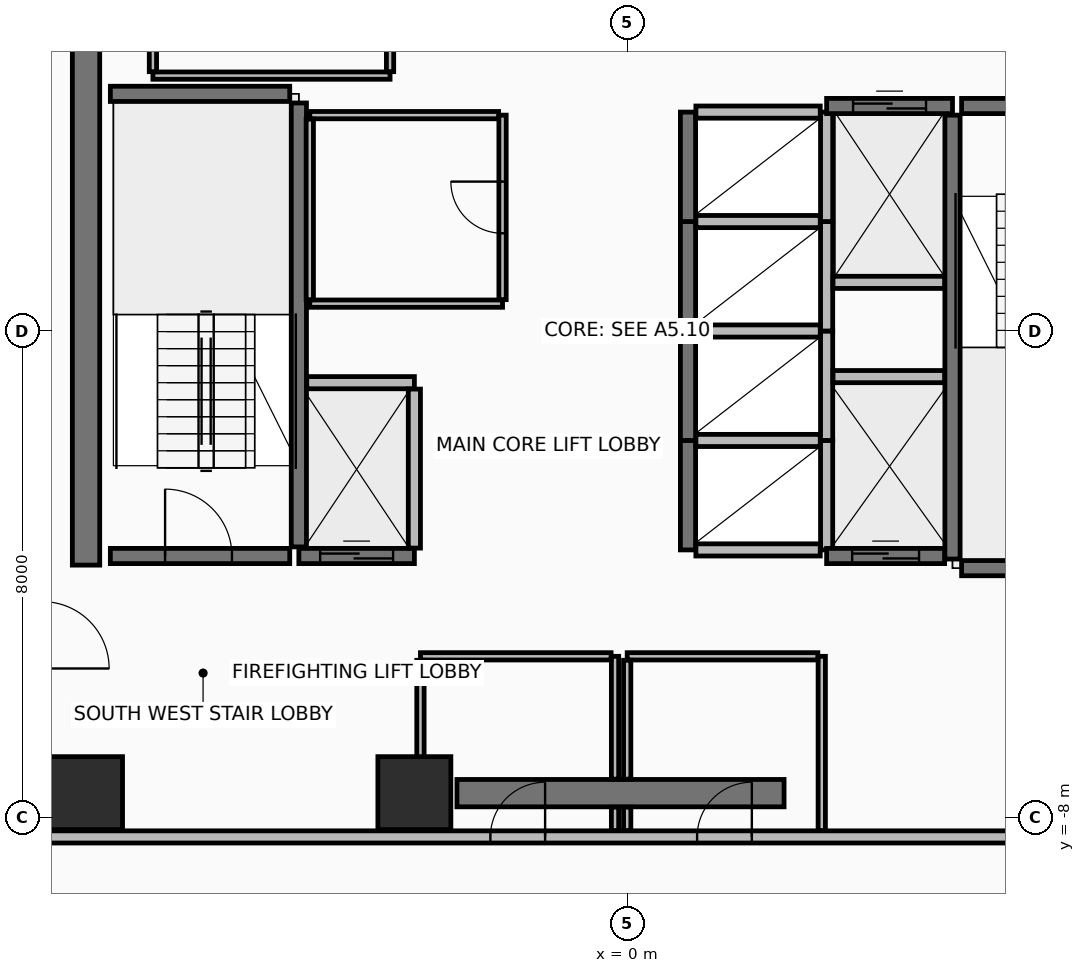
"""IFC4 building model, lengths in metres.
Left out: names, types, materials, properties, quantities, classifications, styles, units other than length and angle.
Written with IfcOpenShell. Run it as: python <this file> out.ifc"""

import sys

from ifc_helpers import new_model, si_unit, direction, frame, frame_2d, origin, origin_2d, place, context, subcontext, project, spatial, rectangle, extrude, element, fill, save


model = new_model("IFC4")
c1 = context("Model", 3, precision=1e-05, world=origin(), true_north=direction((0.0, 1.0)))
c2 = subcontext(c1, "Body", "Model", "MODEL_VIEW")
j1 = project(units=[si_unit("LENGTHUNIT", "METRE"), si_unit("PLANEANGLEUNIT", "RADIAN")], contexts=[c1])
p1 = place(None, origin())
s1 = spatial("IfcSite", under=j1, at=p1, CompositionType="ELEMENT")
p2 = place(p1, origin())
s2 = spatial("IfcBuilding", under=s1, at=p2, CompositionType="ELEMENT")
p3 = place(p2, frame((0.0, 0.0, 211.25)))
s3 = spatial("IfcBuildingStorey", under=s2, at=p3, CompositionType="ELEMENT", Elevation=211.25)
for number, where, z_axis, x_axis in (
    (1, (-8.9, -7.6, 0.0), (0.0, 0.0, 1.0), (1.0, 0.0, 0.0)),
    (2, (-3.5, -7.6, 0.0), (0.0, 0.0, 1.0), (1.0, 0.0, 0.0)),
):
    element("IfcColumn", number, at=place(p3, frame(where, z_axis=z_axis, x_axis=x_axis)), inside=s3, PredefinedType="COLUMN", context=c2, shape_type="SweptSolid", body=[
        extrude(rectangle(XDim=1.2, YDim=1.2, at=origin_2d()), origin(), (0.0, 0.0, 1.0), 3.6),
    ])
p4 = place(p3, frame((-2.8, -7.6, 0.0), z_axis=(0.0, 0.0, 1.0), x_axis=(1.0, 0.0, 0.0)))
e3 = element("IfcWall", 3, at=p4, inside=s3, PredefinedType="SHEAR", context=c2, shape_type="SweptSolid", body=[
    extrude(rectangle(XDim=5.38, YDim=0.45, at=frame_2d((2.69, 0.0))), origin(), (0.0, 0.0, 1.0), 3.42),
])
p5 = place(p3, frame((-8.9, -3.85, 0.0), z_axis=(0.0, 0.0, 1.0), x_axis=(0.0, 1.0, 0.0)))
e4 = element("IfcWall", 4, at=p5, inside=s3, PredefinedType="SHEAR", context=c2, shape_type="SweptSolid", body=[
    extrude(rectangle(XDim=10.7, YDim=0.45, at=frame_2d((5.35, 0.0))), origin(), (0.0, 0.0, 1.0), 3.42),
])
p6 = place(p3, frame((-9.62, -8.32, 0.0), z_axis=(0.0, 0.0, 1.0), x_axis=(1.0, 0.0, 0.0)))
e5 = element("IfcWall", 5, at=p6, inside=s3, PredefinedType="PARTITIONING", context=c2, shape_type="SweptSolid", body=[
    extrude(rectangle(XDim=19.24, YDim=0.2, at=frame_2d((9.62, 0.0))), origin(), (0.0, 0.0, 1.0), 2.865),
])
p7 = place(p6, frame((7.37, 0.0, 0.0)))
e6 = element("IfcOpeningElement", 6, at=p7, cuts=e5, PredefinedType="OPENING", context=c2, shape_type="SweptSolid", body=[
    extrude(rectangle(XDim=0.9, YDim=2.1, at=frame_2d((0.45, 1.05))), frame((0.0, 0.11, 0.0), z_axis=(0.0, -1.0, 0.0), x_axis=(1.0, 0.0, 0.0)), (0.0, 0.0, 1.0), 0.22),
])
p8 = place(p6, frame((10.77, 0.0, 0.0)))
e7 = element("IfcOpeningElement", 7, at=p8, cuts=e5, PredefinedType="OPENING", context=c2, shape_type="SweptSolid", body=[
    extrude(rectangle(XDim=0.9, YDim=2.1, at=frame_2d((0.45, 1.05))), frame((0.0, 0.11, 0.0), z_axis=(0.0, -1.0, 0.0), x_axis=(1.0, 0.0, 0.0)), (0.0, 0.0, 1.0), 0.22),
])
p9 = place(p3, frame((-5.4, -3.55, 0.0), z_axis=(0.0, 0.0, 1.0), x_axis=(0.0, 1.0, 0.0)))
e8 = element("IfcWall", 8, at=p9, inside=s3, PredefinedType="SHEAR", context=c2, shape_type="SweptSolid", body=[
    extrude(rectangle(XDim=7.3, YDim=0.25, at=frame_2d((3.65, 0.0))), origin(), (0.0, 0.0, 1.0), 3.42),
])
p10 = place(p3, frame((-8.5, -3.7, 0.0), z_axis=(0.0, 0.0, 1.0), x_axis=(1.0, 0.0, 0.0)))
e9 = element("IfcWall", 9, at=p10, inside=s3, PredefinedType="SHEAR", context=c2, shape_type="SweptSolid", body=[
    extrude(rectangle(XDim=2.95, YDim=0.25, at=frame_2d((1.475, 0.0))), origin(), (0.0, 0.0, 1.0), 3.42),
])
p11 = place(p10, frame((0.9, 0.0, 0.0)))
e10 = element("IfcOpeningElement", 10, at=p11, cuts=e9, PredefinedType="OPENING", context=c2, shape_type="SweptSolid", body=[
    extrude(rectangle(XDim=1.1, YDim=2.15, at=frame_2d((0.55, 1.075))), frame((0.0, 0.135, 0.0), z_axis=(0.0, -1.0, 0.0), x_axis=(1.0, 0.0, 0.0)), (0.0, 0.0, 1.0), 0.27),
])
p12 = place(p3, frame((-8.5, 3.9, 0.0), z_axis=(0.0, 0.0, 1.0), x_axis=(1.0, 0.0, 0.0)))
e11 = element("IfcWall", 11, at=p12, inside=s3, PredefinedType="SHEAR", context=c2, shape_type="SweptSolid", body=[
    extrude(rectangle(XDim=2.95, YDim=0.25, at=frame_2d((1.475, 0.0))), origin(), (0.0, 0.0, 1.0), 3.42),
])
p13 = place(p3, frame((5.35, -3.75, 0.0), z_axis=(0.0, 0.0, 1.0), x_axis=(0.0, 1.0, 0.0)))
e12 = element("IfcWall", 12, at=p13, inside=s3, PredefinedType="SHEAR", context=c2, shape_type="SweptSolid", body=[
    extrude(rectangle(XDim=7.3, YDim=0.25, at=frame_2d((3.65, 0.0))), origin(), (0.0, 0.0, 1.0), 3.42),
])
p14 = place(p3, frame((5.5, 3.7, 0.0), z_axis=(0.0, 0.0, 1.0), x_axis=(1.0, 0.0, 0.0)))
e13 = element("IfcWall", 13, at=p14, inside=s3, PredefinedType="SHEAR", context=c2, shape_type="SweptSolid", body=[
    extrude(rectangle(XDim=3.0, YDim=0.25, at=frame_2d((1.5, 0.0))), origin(), (0.0, 0.0, 1.0), 3.42),
])
p15 = place(p14, frame((0.95, 0.0, 0.0)))
e14 = element("IfcOpeningElement", 14, at=p15, cuts=e13, PredefinedType="OPENING", context=c2, shape_type="SweptSolid", body=[
    extrude(rectangle(XDim=1.1, YDim=2.15, at=frame_2d((0.55, 1.075))), frame((0.0, 0.135, 0.0), z_axis=(0.0, -1.0, 0.0), x_axis=(1.0, 0.0, 0.0)), (0.0, 0.0, 1.0), 0.27),
])
p16 = place(p3, frame((5.5, -3.9, 0.0), z_axis=(0.0, 0.0, 1.0), x_axis=(1.0, 0.0, 0.0)))
e15 = element("IfcWall", 15, at=p16, inside=s3, PredefinedType="SHEAR", context=c2, shape_type="SweptSolid", body=[
    extrude(rectangle(XDim=3.0, YDim=0.25, at=frame_2d((1.5, 0.0))), origin(), (0.0, 0.0, 1.0), 3.42),
])
p17 = place(p3, frame((1.0, -3.6, 0.0), z_axis=(0.0, 0.0, 1.0), x_axis=(0.0, 1.0, 0.0)))
e16 = element("IfcWall", 16, at=p17, inside=s3, PredefinedType="SHEAR", context=c2, shape_type="SweptSolid", body=[
    extrude(rectangle(XDim=1.8, YDim=0.25, at=frame_2d((0.9, 0.0))), origin(), (0.0, 0.0, 1.0), 3.42),
])
p18 = place(p3, frame((3.28, -3.6, 0.0), z_axis=(0.0, 0.0, 1.0), x_axis=(0.0, 1.0, 0.0)))
e17 = element("IfcWall", 17, at=p18, inside=s3, PredefinedType="PARTITIONING", context=c2, shape_type="SweptSolid", body=[
    extrude(rectangle(XDim=1.8, YDim=0.2, at=frame_2d((0.9, 0.0))), origin(), (0.0, 0.0, 1.0), 3.42),
])
for number, where, z_axis, x_axis in (
    (18, (1.13, -3.6, 0.0), (0.0, 0.0, 1.0), (1.0, 0.0, 0.0)),
    (19, (1.13, -1.8, 0.0), (0.0, 0.0, 1.0), (1.0, 0.0, 0.0)),
):
    element("IfcWall", number, at=place(p3, frame(where, z_axis=z_axis, x_axis=x_axis)), inside=s3, PredefinedType="PARTITIONING", context=c2, shape_type="SweptSolid", body=[
        extrude(rectangle(XDim=2.045, YDim=0.2, at=frame_2d((1.022, 0.0))), origin(), (0.0, 0.0, 1.0), 3.42),
    ])
p19 = place(p3, frame((1.0, -1.8, 0.0), z_axis=(0.0, 0.0, 1.0), x_axis=(0.0, 1.0, 0.0)))
e20 = element("IfcWall", 20, at=p19, inside=s3, PredefinedType="SHEAR", context=c2, shape_type="SweptSolid", body=[
    extrude(rectangle(XDim=1.8, YDim=0.25, at=frame_2d((0.9, 0.0))), origin(), (0.0, 0.0, 1.0), 3.42),
])
p20 = place(p3, frame((3.28, -1.8, 0.0), z_axis=(0.0, 0.0, 1.0), x_axis=(0.0, 1.0, 0.0)))
e21 = element("IfcWall", 21, at=p20, inside=s3, PredefinedType="PARTITIONING", context=c2, shape_type="SweptSolid", body=[
    extrude(rectangle(XDim=1.8, YDim=0.2, at=frame_2d((0.9, 0.0))), origin(), (0.0, 0.0, 1.0), 3.42),
])
p21 = place(p3, frame((1.13, 0.0, 0.0), z_axis=(0.0, 0.0, 1.0), x_axis=(1.0, 0.0, 0.0)))
e22 = element("IfcWall", 22, at=p21, inside=s3, PredefinedType="PARTITIONING", context=c2, shape_type="SweptSolid", body=[
    extrude(rectangle(XDim=2.045, YDim=0.2, at=frame_2d((1.022, 0.0))), origin(), (0.0, 0.0, 1.0), 3.42),
])
p22 = place(p3, frame((1.0, 0.0, 0.0), z_axis=(0.0, 0.0, 1.0), x_axis=(0.0, 1.0, 0.0)))
e23 = element("IfcWall", 23, at=p22, inside=s3, PredefinedType="SHEAR", context=c2, shape_type="SweptSolid", body=[
    extrude(rectangle(XDim=1.8, YDim=0.25, at=frame_2d((0.9, 0.0))), origin(), (0.0, 0.0, 1.0), 3.42),
])
p23 = place(p3, frame((3.28, 0.0, 0.0), z_axis=(0.0, 0.0, 1.0), x_axis=(0.0, 1.0, 0.0)))
e24 = element("IfcWall", 24, at=p23, inside=s3, PredefinedType="PARTITIONING", context=c2, shape_type="SweptSolid", body=[
    extrude(rectangle(XDim=1.8, YDim=0.2, at=frame_2d((0.9, 0.0))), origin(), (0.0, 0.0, 1.0), 3.42),
])
p24 = place(p3, frame((1.13, 1.8, 0.0), z_axis=(0.0, 0.0, 1.0), x_axis=(1.0, 0.0, 0.0)))
e25 = element("IfcWall", 25, at=p24, inside=s3, PredefinedType="PARTITIONING", context=c2, shape_type="SweptSolid", body=[
    extrude(rectangle(XDim=2.045, YDim=0.2, at=frame_2d((1.022, 0.0))), origin(), (0.0, 0.0, 1.0), 3.42),
])
p25 = place(p3, frame((1.0, 1.8, 0.0), z_axis=(0.0, 0.0, 1.0), x_axis=(0.0, 1.0, 0.0)))
e26 = element("IfcWall", 26, at=p25, inside=s3, PredefinedType="SHEAR", context=c2, shape_type="SweptSolid", body=[
    extrude(rectangle(XDim=1.8, YDim=0.25, at=frame_2d((0.9, 0.0))), origin(), (0.0, 0.0, 1.0), 3.42),
])
p26 = place(p3, frame((3.28, 1.8, 0.0), z_axis=(0.0, 0.0, 1.0), x_axis=(0.0, 1.0, 0.0)))
e27 = element("IfcWall", 27, at=p26, inside=s3, PredefinedType="PARTITIONING", context=c2, shape_type="SweptSolid", body=[
    extrude(rectangle(XDim=1.8, YDim=0.2, at=frame_2d((0.9, 0.0))), origin(), (0.0, 0.0, 1.0), 3.42),
])
p27 = place(p3, frame((1.13, 3.6, 0.0), z_axis=(0.0, 0.0, 1.0), x_axis=(1.0, 0.0, 0.0)))
e28 = element("IfcWall", 28, at=p27, inside=s3, PredefinedType="PARTITIONING", context=c2, shape_type="SweptSolid", body=[
    extrude(rectangle(XDim=2.045, YDim=0.2, at=frame_2d((1.022, 0.0))), origin(), (0.0, 0.0, 1.0), 2.715),
])
p28 = place(p3, frame((-5.4, -3.7, 0.0), z_axis=(0.0, 0.0, 1.0), x_axis=(1.0, 0.0, 0.0)))
e29 = element("IfcWall", 29, at=p28, inside=s3, PredefinedType="SHEAR", context=c2, shape_type="SweptSolid", body=[
    extrude(rectangle(XDim=1.9, YDim=0.25, at=frame_2d((0.95, 0.0))), origin(), (0.0, 0.0, 1.0), 3.42),
])
p29 = place(p28, frame((0.35, 0.0, 0.0)))
e30 = element("IfcOpeningElement", 30, at=p29, cuts=e29, PredefinedType="OPENING", context=c2, shape_type="SweptSolid", body=[
    extrude(rectangle(XDim=1.2, YDim=2.2, at=frame_2d((0.6, 1.1))), frame((0.0, 0.135, 0.0), z_axis=(0.0, -1.0, 0.0), x_axis=(1.0, 0.0, 0.0)), (0.0, 0.0, 1.0), 0.27),
])
p30 = place(p3, frame((-5.27, -0.85, 0.0), z_axis=(0.0, 0.0, 1.0), x_axis=(1.0, 0.0, 0.0)))
e31 = element("IfcWall", 31, at=p30, inside=s3, PredefinedType="PARTITIONING", context=c2, shape_type="SweptSolid", body=[
    extrude(rectangle(XDim=1.77, YDim=0.2, at=frame_2d((0.885, 0.0))), origin(), (0.0, 0.0, 1.0), 3.42),
])
p31 = place(p3, frame((-3.5, -3.57, 0.0), z_axis=(0.0, 0.0, 1.0), x_axis=(0.0, 1.0, 0.0)))
e32 = element("IfcWall", 32, at=p31, inside=s3, PredefinedType="PARTITIONING", context=c2, shape_type="SweptSolid", body=[
    extrude(rectangle(XDim=2.615, YDim=0.2, at=frame_2d((1.308, 0.0))), origin(), (0.0, 0.0, 1.0), 3.42),
])
p32 = place(p3, frame((3.28, 3.7, 0.0), z_axis=(0.0, 0.0, 1.0), x_axis=(1.0, 0.0, 0.0)))
e33 = element("IfcWall", 33, at=p32, inside=s3, PredefinedType="SHEAR", context=c2, shape_type="SweptSolid", body=[
    extrude(rectangle(XDim=2.07, YDim=0.25, at=frame_2d((1.035, 0.0))), origin(), (0.0, 0.0, 1.0), 3.42),
])
p33 = place(p32, frame((0.435, 0.0, 0.0)))
e34 = element("IfcOpeningElement", 34, at=p33, cuts=e33, PredefinedType="OPENING", context=c2, shape_type="SweptSolid", body=[
    extrude(rectangle(XDim=1.2, YDim=2.2, at=frame_2d((0.6, 1.1))), frame((0.0, 0.135, 0.0), z_axis=(0.0, -1.0, 0.0), x_axis=(1.0, 0.0, 0.0)), (0.0, 0.0, 1.0), 0.27),
])
p34 = place(p3, frame((3.385, 0.8, 0.0), z_axis=(0.0, 0.0, 1.0), x_axis=(1.0, 0.0, 0.0)))
e35 = element("IfcWall", 35, at=p34, inside=s3, PredefinedType="PARTITIONING", context=c2, shape_type="SweptSolid", body=[
    extrude(rectangle(XDim=1.835, YDim=0.2, at=frame_2d((0.917, 0.0))), origin(), (0.0, 0.0, 1.0), 3.42),
])
p35 = place(p3, frame((3.28, -3.7, 0.0), z_axis=(0.0, 0.0, 1.0), x_axis=(1.0, 0.0, 0.0)))
e36 = element("IfcWall", 36, at=p35, inside=s3, PredefinedType="SHEAR", context=c2, shape_type="SweptSolid", body=[
    extrude(rectangle(XDim=1.94, YDim=0.25, at=frame_2d((0.97, 0.0))), origin(), (0.0, 0.0, 1.0), 3.42),
])
p36 = place(p35, frame((0.42, 0.0, 0.0)))
e37 = element("IfcOpeningElement", 37, at=p36, cuts=e36, PredefinedType="OPENING", context=c2, shape_type="SweptSolid", body=[
    extrude(rectangle(XDim=1.1, YDim=2.2, at=frame_2d((0.55, 1.1))), frame((0.0, 0.135, 0.0), z_axis=(0.0, -1.0, 0.0), x_axis=(1.0, 0.0, 0.0)), (0.0, 0.0, 1.0), 0.27),
])
p37 = place(p3, frame((3.385, -0.75, 0.0), z_axis=(0.0, 0.0, 1.0), x_axis=(1.0, 0.0, 0.0)))
e38 = element("IfcWall", 38, at=p37, inside=s3, PredefinedType="PARTITIONING", context=c2, shape_type="SweptSolid", body=[
    extrude(rectangle(XDim=1.835, YDim=0.2, at=frame_2d((0.917, 0.0))), origin(), (0.0, 0.0, 1.0), 3.42),
])
p38 = place(p3, frame((-5.22, 0.45, 0.0), z_axis=(0.0, 0.0, 1.0), x_axis=(1.0, 0.0, 0.0)))
e39 = element("IfcWall", 39, at=p38, inside=s3, PredefinedType="PARTITIONING", context=c2, shape_type="SweptSolid", body=[
    extrude(rectangle(XDim=3.17, YDim=0.12, at=frame_2d((1.585, 0.0))), origin(), (0.0, 0.0, 1.0), 3.42),
])
p39 = place(p3, frame((-2.05, 0.515, 0.0), z_axis=(0.0, 0.0, 1.0), x_axis=(0.0, 1.0, 0.0)))
e40 = element("IfcWall", 40, at=p39, inside=s3, PredefinedType="PARTITIONING", context=c2, shape_type="SweptSolid", body=[
    extrude(rectangle(XDim=3.035, YDim=0.12, at=frame_2d((1.518, 0.0))), origin(), (0.0, 0.0, 1.0), 3.42),
])
p40 = place(p39, frame((1.092, 0.0, 0.0)))
e41 = element("IfcOpeningElement", 41, at=p40, cuts=e40, PredefinedType="OPENING", context=c2, shape_type="SweptSolid", body=[
    extrude(rectangle(XDim=0.85, YDim=2.1, at=frame_2d((0.425, 1.05))), frame((0.0, 0.07, 0.0), z_axis=(0.0, -1.0, 0.0), x_axis=(1.0, 0.0, 0.0)), (0.0, 0.0, 1.0), 0.14),
])
p41 = place(p3, frame((-2.115, 3.55, 0.0), z_axis=(0.0, 0.0, 1.0), x_axis=(-1.0, 0.0, 0.0)))
e42 = element("IfcWall", 42, at=p41, inside=s3, PredefinedType="PARTITIONING", context=c2, shape_type="SweptSolid", body=[
    extrude(rectangle(XDim=3.105, YDim=0.12, at=frame_2d((1.552, 0.0))), origin(), (0.0, 0.0, 1.0), 3.42),
])
p42 = place(p3, frame((-5.22, 3.485, 0.0), z_axis=(0.0, 0.0, 1.0), x_axis=(0.0, -1.0, 0.0)))
e43 = element("IfcWall", 43, at=p42, inside=s3, PredefinedType="PARTITIONING", context=c2, shape_type="SweptSolid", body=[
    extrude(rectangle(XDim=2.97, YDim=0.12, at=frame_2d((1.485, 0.0))), origin(), (0.0, 0.0, 1.0), 3.42),
])
p43 = place(p3, frame((-0.2, -8.215, 0.0), z_axis=(0.0, 0.0, 1.0), x_axis=(0.0, 1.0, 0.0)))
e44 = element("IfcWall", 44, at=p43, inside=s3, PredefinedType="PARTITIONING", context=c2, shape_type="SweptSolid", body=[
    extrude(rectangle(XDim=0.385, YDim=0.12, at=frame_2d((0.192, 0.0))), origin(), (0.0, 0.0, 1.0), 2.715),
])
p44 = place(p3, frame((-0.2, -7.37, 0.0), z_axis=(0.0, 0.0, 1.0), x_axis=(0.0, 1.0, 0.0)))
e45 = element("IfcWall", 45, at=p44, inside=s3, PredefinedType="PARTITIONING", context=c2, shape_type="SweptSolid", body=[
    extrude(rectangle(XDim=2.02, YDim=0.12, at=frame_2d((1.01, 0.0))), origin(), (0.0, 0.0, 1.0), 2.715),
])
p45 = place(p3, frame((-0.265, -5.35, 0.0), z_axis=(0.0, 0.0, 1.0), x_axis=(-1.0, 0.0, 0.0)))
e46 = element("IfcWall", 46, at=p45, inside=s3, PredefinedType="PARTITIONING", context=c2, shape_type="SweptSolid", body=[
    extrude(rectangle(XDim=3.135, YDim=0.12, at=frame_2d((1.567, 0.0))), origin(), (0.0, 0.0, 1.0), 2.715),
])
p46 = place(p3, frame((-3.4, -5.415, 0.0), z_axis=(0.0, 0.0, 1.0), x_axis=(0.0, -1.0, 0.0)))
e47 = element("IfcWall", 47, at=p46, inside=s3, PredefinedType="PARTITIONING", context=c2, shape_type="SweptSolid", body=[
    extrude(rectangle(XDim=2.8, YDim=0.12, at=frame_2d((1.4, 0.0))), origin(), (0.0, 0.0, 1.0), 2.715),
])
p47 = place(p3, frame((3.2, -8.215, 0.0), z_axis=(0.0, 0.0, 1.0), x_axis=(0.0, 1.0, 0.0)))
e48 = element("IfcWall", 48, at=p47, inside=s3, PredefinedType="PARTITIONING", context=c2, shape_type="SweptSolid", body=[
    extrude(rectangle(XDim=2.865, YDim=0.12, at=frame_2d((1.433, 0.0))), origin(), (0.0, 0.0, 1.0), 2.715),
])
p48 = place(p3, frame((3.135, -5.35, 0.0), z_axis=(0.0, 0.0, 1.0), x_axis=(-1.0, 0.0, 0.0)))
e49 = element("IfcWall", 49, at=p48, inside=s3, PredefinedType="PARTITIONING", context=c2, shape_type="SweptSolid", body=[
    extrude(rectangle(XDim=3.135, YDim=0.12, at=frame_2d((1.567, 0.0))), origin(), (0.0, 0.0, 1.0), 3.42),
])
p49 = place(p3, frame((0.0, -5.415, 0.0), z_axis=(0.0, 0.0, 1.0), x_axis=(0.0, -1.0, 0.0)))
e50 = element("IfcWall", 50, at=p49, inside=s3, PredefinedType="PARTITIONING", context=c2, shape_type="SweptSolid", body=[
    extrude(rectangle(XDim=1.955, YDim=0.12, at=frame_2d((0.978, 0.0))), origin(), (0.0, 0.0, 1.0), 2.715),
])
p50 = place(p3, frame((0.0, -7.83, 0.0), z_axis=(0.0, 0.0, 1.0), x_axis=(0.0, -1.0, 0.0)))
e51 = element("IfcWall", 51, at=p50, inside=s3, PredefinedType="PARTITIONING", context=c2, shape_type="SweptSolid", body=[
    extrude(rectangle(XDim=0.385, YDim=0.12, at=frame_2d((0.192, 0.0))), origin(), (0.0, 0.0, 1.0), 2.715),
])
p51 = place(p3, frame((-7.8, 4.2, 0.0), z_axis=(0.0, 0.0, 1.0), x_axis=(1.0, 0.0, 0.0)))
e52 = element("IfcWall", 52, at=p51, inside=s3, PredefinedType="PARTITIONING", context=c2, shape_type="SweptSolid", body=[
    extrude(rectangle(XDim=3.9, YDim=0.12, at=frame_2d((1.95, 0.0))), origin(), (0.0, 0.0, 1.0), 3.42),
])
for number, where, z_axis, x_axis in (
    (53, (-3.9, 4.265, 0.0), (0.0, 0.0, 1.0), (0.0, 1.0, 0.0)),
    (54, (-7.8, 8.215, 0.0), (0.0, 0.0, 1.0), (0.0, -1.0, 0.0)),
):
    element("IfcWall", number, at=place(p3, frame(where, z_axis=z_axis, x_axis=x_axis)), inside=s3, PredefinedType="PARTITIONING", context=c2, shape_type="SweptSolid", body=[
        extrude(rectangle(XDim=3.95, YDim=0.12, at=frame_2d((1.975, 0.0))), origin(), (0.0, 0.0, 1.0), 2.715),
    ])
p52 = place(p11, origin())
e55 = element("IfcDoor", 55, at=p52, inside=s3, OperationType="SINGLE_SWING_LEFT", PredefinedType="DOOR", context=c2, shape_type="SweptSolid", body=[
    extrude(rectangle(XDim=1.1, YDim=2.15, at=frame_2d((0.55, 1.075))), frame((0.0, 0.025, 0.0), z_axis=(0.0, -1.0, 0.0), x_axis=(1.0, 0.0, 0.0)), (0.0, 0.0, 1.0), 0.05),
])
fill(e10, e55)
p53 = place(p29, origin())
e56 = element("IfcDoor", 56, at=p53, inside=s3, OperationType="SLIDING_TO_RIGHT", PredefinedType="DOOR", context=c2, shape_type="SweptSolid", body=[
    extrude(rectangle(XDim=1.2, YDim=2.2, at=frame_2d((0.6, 1.1))), frame((0.0, 0.025, 0.0), z_axis=(0.0, -1.0, 0.0), x_axis=(1.0, 0.0, 0.0)), (0.0, 0.0, 1.0), 0.05),
])
fill(e30, e56)
p54 = place(p33, origin())
e57 = element("IfcDoor", 57, at=p54, inside=s3, OperationType="SLIDING_TO_RIGHT", PredefinedType="DOOR", context=c2, shape_type="SweptSolid", body=[
    extrude(rectangle(XDim=1.2, YDim=2.2, at=frame_2d((0.6, 1.1))), frame((0.0, 0.025, 0.0), z_axis=(0.0, -1.0, 0.0), x_axis=(1.0, 0.0, 0.0)), (0.0, 0.0, 1.0), 0.05),
])
fill(e34, e57)
p55 = place(p36, origin())
e58 = element("IfcDoor", 58, at=p55, inside=s3, OperationType="SLIDING_TO_LEFT", PredefinedType="DOOR", context=c2, shape_type="SweptSolid", body=[
    extrude(rectangle(XDim=1.1, YDim=2.2, at=frame_2d((0.55, 1.1))), frame((0.0, 0.025, 0.0), z_axis=(0.0, -1.0, 0.0), x_axis=(1.0, 0.0, 0.0)), (0.0, 0.0, 1.0), 0.05),
])
fill(e37, e58)
p56 = place(p40, frame((0.85, 0.0, 0.0), z_axis=(0.0, 0.0, 1.0), x_axis=(-1.0, 0.0, 0.0)))
e59 = element("IfcDoor", 59, at=p56, inside=s3, OperationType="SINGLE_SWING_RIGHT", PredefinedType="DOOR", context=c2, shape_type="SweptSolid", body=[
    extrude(rectangle(XDim=0.85, YDim=2.1, at=frame_2d((0.425, 1.05))), frame((0.0, 0.025, 0.0), z_axis=(0.0, -1.0, 0.0), x_axis=(1.0, 0.0, 0.0)), (0.0, 0.0, 1.0), 0.05),
])
fill(e41, e59)
p57 = place(p7, frame((0.9, 0.0, 0.0), z_axis=(0.0, 0.0, 1.0), x_axis=(-1.0, 0.0, 0.0)))
e60 = element("IfcDoor", 60, at=p57, inside=s3, OperationType="SINGLE_SWING_LEFT", PredefinedType="DOOR", context=c2, shape_type="SweptSolid", body=[
    extrude(rectangle(XDim=0.9, YDim=2.1, at=frame_2d((0.45, 1.05))), frame((0.0, 0.025, 0.0), z_axis=(0.0, -1.0, 0.0), x_axis=(1.0, 0.0, 0.0)), (0.0, 0.0, 1.0), 0.05),
])
fill(e6, e60)
p58 = place(p8, frame((0.9, 0.0, 0.0), z_axis=(0.0, 0.0, 1.0), x_axis=(-1.0, 0.0, 0.0)))
e61 = element("IfcDoor", 61, at=p58, inside=s3, OperationType="SINGLE_SWING_LEFT", PredefinedType="DOOR", context=c2, shape_type="SweptSolid", body=[
    extrude(rectangle(XDim=0.9, YDim=2.1, at=frame_2d((0.45, 1.05))), frame((0.0, 0.025, 0.0), z_axis=(0.0, -1.0, 0.0), x_axis=(1.0, 0.0, 0.0)), (0.0, 0.0, 1.0), 0.05),
])
fill(e7, e61)
save(model, sys.argv[1])
